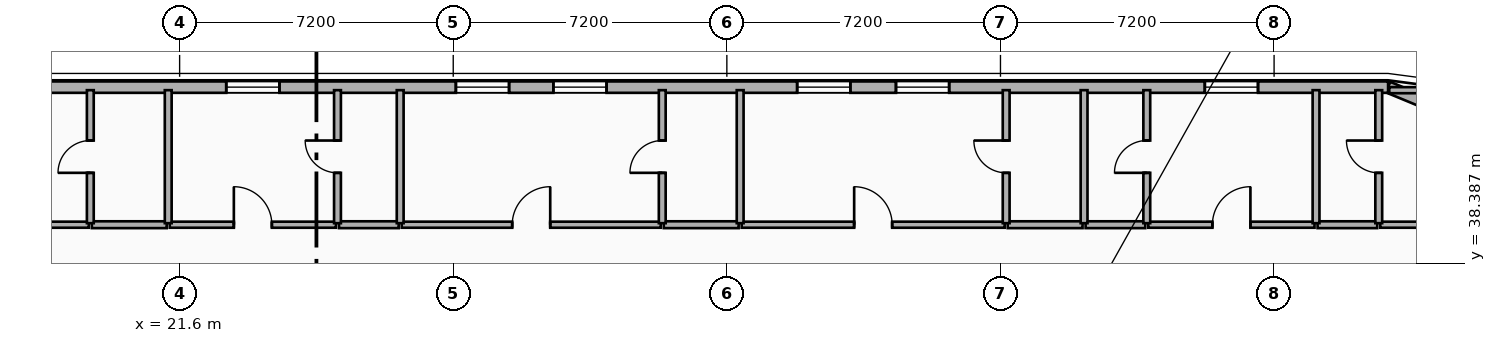
"""IFC4 building model, lengths in metres.
Left out: names, types, materials, properties, quantities, classifications, styles, units other than length and angle.
Written with IfcOpenShell. Run it as: python <this file> out.ifc"""

import sys

from ifc_helpers import new_model, si_unit, direction, frame, frame_2d, origin, place, context, subcontext, project, spatial, rectangle, extrude, element, fill, save


model = new_model("IFC4")
c1 = context("Model", 3, precision=1e-05, world=origin(), true_north=direction((0.0, 1.0)))
c2 = subcontext(c1, "Body", "Model", "MODEL_VIEW")
j1 = project(units=[si_unit("LENGTHUNIT", "METRE"), si_unit("PLANEANGLEUNIT", "RADIAN")], contexts=[c1])
p1 = place(None, origin())
s1 = spatial("IfcSite", under=j1, at=p1, CompositionType="ELEMENT")
p2 = place(p1, origin())
s2 = spatial("IfcBuilding", under=s1, at=p2, CompositionType="ELEMENT")
p3 = place(p2, frame((0.0, 0.0, 118.8)))
s3 = spatial("IfcBuildingStorey", under=s2, at=p3, CompositionType="ELEMENT", Elevation=118.8)
p4 = place(p3, frame((53.4, 43.02, 0.0), z_axis=(0.0, 0.0, 1.0), x_axis=(0.923882414032, -0.382676475685, 0.0)))
e1 = element("IfcWall", 1, at=p4, inside=s3, PredefinedType="SOLIDWALL", context=c2, shape_type="SweptSolid", body=[
    extrude(rectangle(XDim=3.077, YDim=0.3, at=frame_2d((1.539, 0.0))), origin(), (0.0, 0.0, 1.0), 3.24),
])
p5 = place(p3, frame((4.2, 43.02, 0.0), z_axis=(0.0, 0.0, 1.0), x_axis=(1.0, 0.0, 0.0)))
e2 = element("IfcWall", 2, at=p5, inside=s3, PredefinedType="SOLIDWALL", context=c2, shape_type="SweptSolid", body=[
    extrude(rectangle(XDim=49.2, YDim=0.3, at=frame_2d((24.6, 0.0))), origin(), (0.0, 0.0, 1.0), 3.24),
])
p6 = place(p5, frame((9.09, 0.0, 0.85)))
e3 = element("IfcOpeningElement", 3, at=p6, cuts=e2, PredefinedType="OPENING", context=c2, shape_type="SweptSolid", body=[
    extrude(rectangle(XDim=1.4, YDim=1.8, at=frame_2d((0.7, 0.9))), frame((0.0, 0.16, 0.0), z_axis=(0.0, -1.0, 0.0), x_axis=(1.0, 0.0, 0.0)), (0.0, 0.0, 1.0), 0.32),
])
p7 = place(p5, frame((11.92, 0.0, 0.85)))
e4 = element("IfcOpeningElement", 4, at=p7, cuts=e2, PredefinedType="OPENING", context=c2, shape_type="SweptSolid", body=[
    extrude(rectangle(XDim=1.4, YDim=1.8, at=frame_2d((0.7, 0.9))), frame((0.0, 0.16, 0.0), z_axis=(0.0, -1.0, 0.0), x_axis=(1.0, 0.0, 0.0)), (0.0, 0.0, 1.0), 0.32),
])
p8 = place(p5, frame((18.627, 0.0, 0.85)))
e5 = element("IfcOpeningElement", 5, at=p8, cuts=e2, PredefinedType="OPENING", context=c2, shape_type="SweptSolid", body=[
    extrude(rectangle(XDim=1.4, YDim=1.8, at=frame_2d((0.7, 0.9))), frame((0.0, 0.16, 0.0), z_axis=(0.0, -1.0, 0.0), x_axis=(1.0, 0.0, 0.0)), (0.0, 0.0, 1.0), 0.32),
])
p9 = place(p5, frame((24.669, 0.0, 0.85)))
e6 = element("IfcOpeningElement", 6, at=p9, cuts=e2, PredefinedType="OPENING", context=c2, shape_type="SweptSolid", body=[
    extrude(rectangle(XDim=1.4, YDim=1.8, at=frame_2d((0.7, 0.9))), frame((0.0, 0.16, 0.0), z_axis=(0.0, -1.0, 0.0), x_axis=(1.0, 0.0, 0.0)), (0.0, 0.0, 1.0), 0.32),
])
p10 = place(p5, frame((27.235, 0.0, 0.85)))
e7 = element("IfcOpeningElement", 7, at=p10, cuts=e2, PredefinedType="OPENING", context=c2, shape_type="SweptSolid", body=[
    extrude(rectangle(XDim=1.4, YDim=1.8, at=frame_2d((0.7, 0.9))), frame((0.0, 0.16, 0.0), z_axis=(0.0, -1.0, 0.0), x_axis=(1.0, 0.0, 0.0)), (0.0, 0.0, 1.0), 0.32),
])
p11 = place(p5, frame((33.65, 0.0, 0.85)))
e8 = element("IfcOpeningElement", 8, at=p11, cuts=e2, PredefinedType="OPENING", context=c2, shape_type="SweptSolid", body=[
    extrude(rectangle(XDim=1.4, YDim=1.8, at=frame_2d((0.7, 0.9))), frame((0.0, 0.16, 0.0), z_axis=(0.0, -1.0, 0.0), x_axis=(1.0, 0.0, 0.0)), (0.0, 0.0, 1.0), 0.32),
])
p12 = place(p5, frame((36.25, 0.0, 0.85)))
e9 = element("IfcOpeningElement", 9, at=p12, cuts=e2, PredefinedType="OPENING", context=c2, shape_type="SweptSolid", body=[
    extrude(rectangle(XDim=1.4, YDim=1.8, at=frame_2d((0.7, 0.9))), frame((0.0, 0.16, 0.0), z_axis=(0.0, -1.0, 0.0), x_axis=(1.0, 0.0, 0.0)), (0.0, 0.0, 1.0), 0.32),
])
p13 = place(p5, frame((44.377, 0.0, 0.85)))
e10 = element("IfcOpeningElement", 10, at=p13, cuts=e2, PredefinedType="OPENING", context=c2, shape_type="SweptSolid", body=[
    extrude(rectangle(XDim=1.4, YDim=1.8, at=frame_2d((0.7, 0.9))), frame((0.0, 0.16, 0.0), z_axis=(0.0, -1.0, 0.0), x_axis=(1.0, 0.0, 0.0)), (0.0, 0.0, 1.0), 0.32),
])
p14 = place(p3, frame((11.6, 39.4, 0.0), z_axis=(0.0, 0.0, 1.0), x_axis=(1.0, 0.0, 0.0)))
e11 = element("IfcWall", 11, at=p14, inside=s3, PredefinedType="PARTITIONING", context=c2, shape_type="SweptSolid", body=[
    extrude(rectangle(XDim=7.61, YDim=0.16, at=frame_2d((3.805, 0.0))), origin(), (0.0, 0.0, 1.0), 3.24),
])
p15 = place(p14, frame((3.305, 0.0, 0.0)))
e12 = element("IfcOpeningElement", 12, at=p15, cuts=e11, PredefinedType="OPENING", context=c2, shape_type="SweptSolid", body=[
    extrude(rectangle(XDim=1.0, YDim=2.15, at=frame_2d((0.5, 1.075))), frame((0.0, 0.09, 0.0), z_axis=(0.0, -1.0, 0.0), x_axis=(1.0, 0.0, 0.0)), (0.0, 0.0, 1.0), 0.18),
])
p16 = place(p3, frame((19.29, 39.4, 0.0), z_axis=(0.0, 0.0, 1.0), x_axis=(1.0, 0.0, 0.0)))
e13 = element("IfcWall", 13, at=p16, inside=s3, PredefinedType="PLUMBINGWALL", context=c2, shape_type="SweptSolid", body=[
    extrude(rectangle(XDim=1.97, YDim=0.18, at=frame_2d((0.985, 0.0))), origin(), (0.0, 0.0, 1.0), 3.24),
])
p17 = place(p3, frame((21.34, 39.4, 0.0), z_axis=(0.0, 0.0, 1.0), x_axis=(1.0, 0.0, 0.0)))
e14 = element("IfcWall", 14, at=p17, inside=s3, PredefinedType="PARTITIONING", context=c2, shape_type="SweptSolid", body=[
    extrude(rectangle(XDim=4.374, YDim=0.16, at=frame_2d((2.187, 0.0))), origin(), (0.0, 0.0, 1.0), 3.24),
])
p18 = place(p17, frame((1.687, 0.0, 0.0)))
e15 = element("IfcOpeningElement", 15, at=p18, cuts=e14, PredefinedType="OPENING", context=c2, shape_type="SweptSolid", body=[
    extrude(rectangle(XDim=1.0, YDim=2.15, at=frame_2d((0.5, 1.075))), frame((0.0, 0.09, 0.0), z_axis=(0.0, -1.0, 0.0), x_axis=(1.0, 0.0, 0.0)), (0.0, 0.0, 1.0), 0.18),
])
p19 = place(p3, frame((25.794, 39.4, 0.0), z_axis=(0.0, 0.0, 1.0), x_axis=(1.0, 0.0, 0.0)))
e16 = element("IfcWall", 16, at=p19, inside=s3, PredefinedType="PLUMBINGWALL", context=c2, shape_type="SweptSolid", body=[
    extrude(rectangle(XDim=1.57, YDim=0.18, at=frame_2d((0.785, 0.0))), origin(), (0.0, 0.0, 1.0), 3.24),
])
p20 = place(p3, frame((27.444, 39.4, 0.0), z_axis=(0.0, 0.0, 1.0), x_axis=(1.0, 0.0, 0.0)))
e17 = element("IfcWall", 17, at=p20, inside=s3, PredefinedType="PARTITIONING", context=c2, shape_type="SweptSolid", body=[
    extrude(rectangle(XDim=6.816, YDim=0.16, at=frame_2d((3.408, 0.0))), origin(), (0.0, 0.0, 1.0), 3.24),
])
p21 = place(p20, frame((2.908, 0.0, 0.0)))
e18 = element("IfcOpeningElement", 18, at=p21, cuts=e17, PredefinedType="OPENING", context=c2, shape_type="SweptSolid", body=[
    extrude(rectangle(XDim=1.0, YDim=2.15, at=frame_2d((0.5, 1.075))), frame((0.0, 0.09, 0.0), z_axis=(0.0, -1.0, 0.0), x_axis=(1.0, 0.0, 0.0)), (0.0, 0.0, 1.0), 0.18),
])
p22 = place(p3, frame((34.34, 39.4, 0.0), z_axis=(0.0, 0.0, 1.0), x_axis=(1.0, 0.0, 0.0)))
e19 = element("IfcWall", 19, at=p22, inside=s3, PredefinedType="PLUMBINGWALL", context=c2, shape_type="SweptSolid", body=[
    extrude(rectangle(XDim=1.97, YDim=0.18, at=frame_2d((0.985, 0.0))), origin(), (0.0, 0.0, 1.0), 3.24),
])
p23 = place(p3, frame((36.39, 39.4, 0.0), z_axis=(0.0, 0.0, 1.0), x_axis=(1.0, 0.0, 0.0)))
e20 = element("IfcWall", 20, at=p23, inside=s3, PredefinedType="PARTITIONING", context=c2, shape_type="SweptSolid", body=[
    extrude(rectangle(XDim=6.92, YDim=0.16, at=frame_2d((3.46, 0.0))), origin(), (0.0, 0.0, 1.0), 3.24),
])
p24 = place(p23, frame((2.96, 0.0, 0.0)))
e21 = element("IfcOpeningElement", 21, at=p24, cuts=e20, PredefinedType="OPENING", context=c2, shape_type="SweptSolid", body=[
    extrude(rectangle(XDim=1.0, YDim=2.15, at=frame_2d((0.5, 1.075))), frame((0.0, 0.09, 0.0), z_axis=(0.0, -1.0, 0.0), x_axis=(1.0, 0.0, 0.0)), (0.0, 0.0, 1.0), 0.18),
])
p25 = place(p3, frame((43.39, 39.4, 0.0), z_axis=(0.0, 0.0, 1.0), x_axis=(1.0, 0.0, 0.0)))
e22 = element("IfcWall", 22, at=p25, inside=s3, PredefinedType="PLUMBINGWALL", context=c2, shape_type="SweptSolid", body=[
    extrude(rectangle(XDim=1.97, YDim=0.18, at=frame_2d((0.985, 0.0))), origin(), (0.0, 0.0, 1.0), 3.24),
])
p26 = place(p3, frame((47.09, 39.4, 0.0), z_axis=(0.0, 0.0, 1.0), x_axis=(1.0, 0.0, 0.0)))
e23 = element("IfcWall", 23, at=p26, inside=s3, PredefinedType="PARTITIONING", context=c2, shape_type="SweptSolid", body=[
    extrude(rectangle(XDim=4.374, YDim=0.16, at=frame_2d((2.187, 0.0))), origin(), (0.0, 0.0, 1.0), 3.24),
])
p27 = place(p26, frame((1.687, 0.0, 0.0)))
e24 = element("IfcOpeningElement", 24, at=p27, cuts=e23, PredefinedType="OPENING", context=c2, shape_type="SweptSolid", body=[
    extrude(rectangle(XDim=1.0, YDim=2.15, at=frame_2d((0.5, 1.075))), frame((0.0, 0.09, 0.0), z_axis=(0.0, -1.0, 0.0), x_axis=(1.0, 0.0, 0.0)), (0.0, 0.0, 1.0), 0.18),
])
p28 = place(p3, frame((45.44, 39.4, 0.0), z_axis=(0.0, 0.0, 1.0), x_axis=(1.0, 0.0, 0.0)))
e25 = element("IfcWall", 25, at=p28, inside=s3, PredefinedType="PLUMBINGWALL", context=c2, shape_type="SweptSolid", body=[
    extrude(rectangle(XDim=1.57, YDim=0.18, at=frame_2d((0.785, 0.0))), origin(), (0.0, 0.0, 1.0), 3.24),
])
p29 = place(p3, frame((53.194, 39.4, 0.0), z_axis=(0.0, 0.0, 1.0), x_axis=(1.0, 0.0, 0.0)))
e26 = element("IfcWall", 26, at=p29, inside=s3, PredefinedType="PARTITIONING", context=c2, shape_type="SweptSolid", body=[
    extrude(rectangle(XDim=4.146, YDim=0.16, at=frame_2d((2.073, 0.0))), origin(), (0.0, 0.0, 1.0), 3.24),
])
p30 = place(p29, frame((1.573, 0.0, 0.0)))
e27 = element("IfcOpeningElement", 27, at=p30, cuts=e26, PredefinedType="OPENING", context=c2, shape_type="SweptSolid", body=[
    extrude(rectangle(XDim=1.0, YDim=2.15, at=frame_2d((0.5, 1.075))), frame((0.0, 0.09, 0.0), z_axis=(0.0, -1.0, 0.0), x_axis=(1.0, 0.0, 0.0)), (0.0, 0.0, 1.0), 0.18),
])
p31 = place(p3, frame((51.544, 39.4, 0.0), z_axis=(0.0, 0.0, 1.0), x_axis=(1.0, 0.0, 0.0)))
e28 = element("IfcWall", 28, at=p31, inside=s3, PredefinedType="PLUMBINGWALL", context=c2, shape_type="SweptSolid", body=[
    extrude(rectangle(XDim=1.57, YDim=0.18, at=frame_2d((0.785, 0.0))), origin(), (0.0, 0.0, 1.0), 3.24),
])
p32 = place(p3, frame((19.25, 39.44, 0.0), z_axis=(0.0, 0.0, 1.0), x_axis=(0.0, 1.0, 0.0)))
e29 = element("IfcWall", 29, at=p32, inside=s3, PredefinedType="PLUMBINGWALL", context=c2, shape_type="SweptSolid", body=[
    extrude(rectangle(XDim=3.5, YDim=0.18, at=frame_2d((1.75, 0.0))), origin(), (0.0, 0.0, 1.0), 3.24),
])
p33 = place(p32, frame((1.325, 0.0, 0.0)))
e30 = element("IfcOpeningElement", 30, at=p33, cuts=e29, PredefinedType="OPENING", context=c2, shape_type="SweptSolid", body=[
    extrude(rectangle(XDim=0.85, YDim=2.1, at=frame_2d((0.425, 1.05))), frame((0.0, 0.1, 0.0), z_axis=(0.0, -1.0, 0.0), x_axis=(1.0, 0.0, 0.0)), (0.0, 0.0, 1.0), 0.2),
])
p34 = place(p3, frame((21.3, 39.44, 0.0), z_axis=(0.0, 0.0, 1.0), x_axis=(0.0, 1.0, 0.0)))
e31 = element("IfcWall", 31, at=p34, inside=s3, PredefinedType="PLUMBINGWALL", context=c2, shape_type="SweptSolid", body=[
    extrude(rectangle(XDim=3.5, YDim=0.18, at=frame_2d((1.75, 0.0))), origin(), (0.0, 0.0, 1.0), 3.24),
])
p35 = place(p3, frame((25.754, 39.44, 0.0), z_axis=(0.0, 0.0, 1.0), x_axis=(0.0, 1.0, 0.0)))
e32 = element("IfcWall", 32, at=p35, inside=s3, PredefinedType="PLUMBINGWALL", context=c2, shape_type="SweptSolid", body=[
    extrude(rectangle(XDim=3.5, YDim=0.18, at=frame_2d((1.75, 0.0))), origin(), (0.0, 0.0, 1.0), 3.24),
])
p36 = place(p35, frame((1.325, 0.0, 0.0)))
e33 = element("IfcOpeningElement", 33, at=p36, cuts=e32, PredefinedType="OPENING", context=c2, shape_type="SweptSolid", body=[
    extrude(rectangle(XDim=0.85, YDim=2.1, at=frame_2d((0.425, 1.05))), frame((0.0, 0.1, 0.0), z_axis=(0.0, -1.0, 0.0), x_axis=(1.0, 0.0, 0.0)), (0.0, 0.0, 1.0), 0.2),
])
p37 = place(p3, frame((27.404, 39.44, 0.0), z_axis=(0.0, 0.0, 1.0), x_axis=(0.0, 1.0, 0.0)))
e34 = element("IfcWall", 34, at=p37, inside=s3, PredefinedType="PLUMBINGWALL", context=c2, shape_type="SweptSolid", body=[
    extrude(rectangle(XDim=3.5, YDim=0.18, at=frame_2d((1.75, 0.0))), origin(), (0.0, 0.0, 1.0), 3.24),
])
p38 = place(p3, frame((34.3, 39.44, 0.0), z_axis=(0.0, 0.0, 1.0), x_axis=(0.0, 1.0, 0.0)))
e35 = element("IfcWall", 35, at=p38, inside=s3, PredefinedType="PLUMBINGWALL", context=c2, shape_type="SweptSolid", body=[
    extrude(rectangle(XDim=3.5, YDim=0.18, at=frame_2d((1.75, 0.0))), origin(), (0.0, 0.0, 1.0), 3.24),
])
p39 = place(p38, frame((1.325, 0.0, 0.0)))
e36 = element("IfcOpeningElement", 36, at=p39, cuts=e35, PredefinedType="OPENING", context=c2, shape_type="SweptSolid", body=[
    extrude(rectangle(XDim=0.85, YDim=2.1, at=frame_2d((0.425, 1.05))), frame((0.0, 0.1, 0.0), z_axis=(0.0, -1.0, 0.0), x_axis=(1.0, 0.0, 0.0)), (0.0, 0.0, 1.0), 0.2),
])
p40 = place(p3, frame((36.35, 39.44, 0.0), z_axis=(0.0, 0.0, 1.0), x_axis=(0.0, 1.0, 0.0)))
e37 = element("IfcWall", 37, at=p40, inside=s3, PredefinedType="PLUMBINGWALL", context=c2, shape_type="SweptSolid", body=[
    extrude(rectangle(XDim=3.5, YDim=0.18, at=frame_2d((1.75, 0.0))), origin(), (0.0, 0.0, 1.0), 3.24),
])
p41 = place(p3, frame((43.35, 39.44, 0.0), z_axis=(0.0, 0.0, 1.0), x_axis=(0.0, 1.0, 0.0)))
e38 = element("IfcWall", 38, at=p41, inside=s3, PredefinedType="PLUMBINGWALL", context=c2, shape_type="SweptSolid", body=[
    extrude(rectangle(XDim=3.5, YDim=0.18, at=frame_2d((1.75, 0.0))), origin(), (0.0, 0.0, 1.0), 3.24),
])
p42 = place(p41, frame((1.325, 0.0, 0.0)))
e39 = element("IfcOpeningElement", 39, at=p42, cuts=e38, PredefinedType="OPENING", context=c2, shape_type="SweptSolid", body=[
    extrude(rectangle(XDim=0.85, YDim=2.1, at=frame_2d((0.425, 1.05))), frame((0.0, 0.1, 0.0), z_axis=(0.0, -1.0, 0.0), x_axis=(1.0, 0.0, 0.0)), (0.0, 0.0, 1.0), 0.2),
])
p43 = place(p3, frame((45.4, 39.44, 0.0), z_axis=(0.0, 0.0, 1.0), x_axis=(0.0, 1.0, 0.0)))
e40 = element("IfcWall", 40, at=p43, inside=s3, PredefinedType="PLUMBINGWALL", context=c2, shape_type="SweptSolid", body=[
    extrude(rectangle(XDim=3.5, YDim=0.18, at=frame_2d((1.75, 0.0))), origin(), (0.0, 0.0, 1.0), 3.24),
])
p44 = place(p3, frame((47.05, 39.44, 0.0), z_axis=(0.0, 0.0, 1.0), x_axis=(0.0, 1.0, 0.0)))
e41 = element("IfcWall", 41, at=p44, inside=s3, PredefinedType="PLUMBINGWALL", context=c2, shape_type="SweptSolid", body=[
    extrude(rectangle(XDim=3.5, YDim=0.18, at=frame_2d((1.75, 0.0))), origin(), (0.0, 0.0, 1.0), 3.24),
])
p45 = place(p44, frame((1.325, 0.0, 0.0)))
e42 = element("IfcOpeningElement", 42, at=p45, cuts=e41, PredefinedType="OPENING", context=c2, shape_type="SweptSolid", body=[
    extrude(rectangle(XDim=0.85, YDim=2.1, at=frame_2d((0.425, 1.05))), frame((0.0, 0.1, 0.0), z_axis=(0.0, -1.0, 0.0), x_axis=(1.0, 0.0, 0.0)), (0.0, 0.0, 1.0), 0.2),
])
p46 = place(p3, frame((51.504, 39.44, 0.0), z_axis=(0.0, 0.0, 1.0), x_axis=(0.0, 1.0, 0.0)))
e43 = element("IfcWall", 43, at=p46, inside=s3, PredefinedType="PLUMBINGWALL", context=c2, shape_type="SweptSolid", body=[
    extrude(rectangle(XDim=3.5, YDim=0.18, at=frame_2d((1.75, 0.0))), origin(), (0.0, 0.0, 1.0), 3.24),
])
p47 = place(p3, frame((53.154, 39.44, 0.0), z_axis=(0.0, 0.0, 1.0), x_axis=(0.0, 1.0, 0.0)))
e44 = element("IfcWall", 44, at=p47, inside=s3, PredefinedType="PLUMBINGWALL", context=c2, shape_type="SweptSolid", body=[
    extrude(rectangle(XDim=3.5, YDim=0.18, at=frame_2d((1.75, 0.0))), origin(), (0.0, 0.0, 1.0), 3.24),
])
p48 = place(p47, frame((1.325, 0.0, 0.0)))
e45 = element("IfcOpeningElement", 45, at=p48, cuts=e44, PredefinedType="OPENING", context=c2, shape_type="SweptSolid", body=[
    extrude(rectangle(XDim=0.85, YDim=2.1, at=frame_2d((0.425, 1.05))), frame((0.0, 0.1, 0.0), z_axis=(0.0, -1.0, 0.0), x_axis=(1.0, 0.0, 0.0)), (0.0, 0.0, 1.0), 0.2),
])
p49 = place(p3, frame((53.43, 42.94, 0.0), z_axis=(0.0, 0.0, 1.0), x_axis=(1.0, 0.0, 0.0)))
e46 = element("IfcWall", 46, at=p49, inside=s3, PredefinedType="PARTITIONING", context=c2, shape_type="SweptSolid", body=[
    extrude(rectangle(XDim=3.88, YDim=0.16, at=frame_2d((1.94, 0.0))), origin(), (0.0, 0.0, 1.0), 3.24),
])
p50 = place(p8, origin())
e47 = element("IfcWindow", 47, at=p50, inside=s3, PartitioningType="SINGLE_PANEL", PredefinedType="WINDOW", context=c2, shape_type="SweptSolid", body=[
    extrude(rectangle(XDim=1.4, YDim=1.8, at=frame_2d((0.7, 0.9))), frame((0.0, 0.03, 0.0), z_axis=(0.0, -1.0, 0.0), x_axis=(1.0, 0.0, 0.0)), (0.0, 0.0, 1.0), 0.06),
])
fill(e5, e47)
p51 = place(p9, origin())
e48 = element("IfcWindow", 48, at=p51, inside=s3, PartitioningType="SINGLE_PANEL", PredefinedType="WINDOW", context=c2, shape_type="SweptSolid", body=[
    extrude(rectangle(XDim=1.4, YDim=1.8, at=frame_2d((0.7, 0.9))), frame((0.0, 0.03, 0.0), z_axis=(0.0, -1.0, 0.0), x_axis=(1.0, 0.0, 0.0)), (0.0, 0.0, 1.0), 0.06),
])
fill(e6, e48)
p52 = place(p10, origin())
e49 = element("IfcWindow", 49, at=p52, inside=s3, PartitioningType="SINGLE_PANEL", PredefinedType="WINDOW", context=c2, shape_type="SweptSolid", body=[
    extrude(rectangle(XDim=1.4, YDim=1.8, at=frame_2d((0.7, 0.9))), frame((0.0, 0.03, 0.0), z_axis=(0.0, -1.0, 0.0), x_axis=(1.0, 0.0, 0.0)), (0.0, 0.0, 1.0), 0.06),
])
fill(e7, e49)
p53 = place(p11, origin())
e50 = element("IfcWindow", 50, at=p53, inside=s3, PartitioningType="SINGLE_PANEL", PredefinedType="WINDOW", context=c2, shape_type="SweptSolid", body=[
    extrude(rectangle(XDim=1.4, YDim=1.8, at=frame_2d((0.7, 0.9))), frame((0.0, 0.03, 0.0), z_axis=(0.0, -1.0, 0.0), x_axis=(1.0, 0.0, 0.0)), (0.0, 0.0, 1.0), 0.06),
])
fill(e8, e50)
p54 = place(p12, origin())
e51 = element("IfcWindow", 51, at=p54, inside=s3, PartitioningType="SINGLE_PANEL", PredefinedType="WINDOW", context=c2, shape_type="SweptSolid", body=[
    extrude(rectangle(XDim=1.4, YDim=1.8, at=frame_2d((0.7, 0.9))), frame((0.0, 0.03, 0.0), z_axis=(0.0, -1.0, 0.0), x_axis=(1.0, 0.0, 0.0)), (0.0, 0.0, 1.0), 0.06),
])
fill(e9, e51)
p55 = place(p13, origin())
e52 = element("IfcWindow", 52, at=p55, inside=s3, PartitioningType="SINGLE_PANEL", PredefinedType="WINDOW", context=c2, shape_type="SweptSolid", body=[
    extrude(rectangle(XDim=1.4, YDim=1.8, at=frame_2d((0.7, 0.9))), frame((0.0, 0.03, 0.0), z_axis=(0.0, -1.0, 0.0), x_axis=(1.0, 0.0, 0.0)), (0.0, 0.0, 1.0), 0.06),
])
fill(e10, e52)
p56 = place(p18, origin())
e53 = element("IfcDoor", 53, at=p56, inside=s3, OperationType="SINGLE_SWING_LEFT", PredefinedType="DOOR", context=c2, shape_type="SweptSolid", body=[
    extrude(rectangle(XDim=1.0, YDim=2.15, at=frame_2d((0.5, 1.075))), frame((0.0, 0.025, 0.0), z_axis=(0.0, -1.0, 0.0), x_axis=(1.0, 0.0, 0.0)), (0.0, 0.0, 1.0), 0.05),
])
fill(e15, e53)
p57 = place(p21, origin())
e54 = element("IfcDoor", 54, at=p57, inside=s3, OperationType="SINGLE_SWING_RIGHT", PredefinedType="DOOR", context=c2, shape_type="SweptSolid", body=[
    extrude(rectangle(XDim=1.0, YDim=2.15, at=frame_2d((0.5, 1.075))), frame((0.0, 0.025, 0.0), z_axis=(0.0, -1.0, 0.0), x_axis=(1.0, 0.0, 0.0)), (0.0, 0.0, 1.0), 0.05),
])
fill(e18, e54)
p58 = place(p24, origin())
e55 = element("IfcDoor", 55, at=p58, inside=s3, OperationType="SINGLE_SWING_LEFT", PredefinedType="DOOR", context=c2, shape_type="SweptSolid", body=[
    extrude(rectangle(XDim=1.0, YDim=2.15, at=frame_2d((0.5, 1.075))), frame((0.0, 0.025, 0.0), z_axis=(0.0, -1.0, 0.0), x_axis=(1.0, 0.0, 0.0)), (0.0, 0.0, 1.0), 0.05),
])
fill(e21, e55)
p59 = place(p27, origin())
e56 = element("IfcDoor", 56, at=p59, inside=s3, OperationType="SINGLE_SWING_RIGHT", PredefinedType="DOOR", context=c2, shape_type="SweptSolid", body=[
    extrude(rectangle(XDim=1.0, YDim=2.15, at=frame_2d((0.5, 1.075))), frame((0.0, 0.025, 0.0), z_axis=(0.0, -1.0, 0.0), x_axis=(1.0, 0.0, 0.0)), (0.0, 0.0, 1.0), 0.05),
])
fill(e24, e56)
p60 = place(p33, origin())
e57 = element("IfcDoor", 57, at=p60, inside=s3, OperationType="SINGLE_SWING_LEFT", PredefinedType="DOOR", context=c2, shape_type="SweptSolid", body=[
    extrude(rectangle(XDim=0.85, YDim=2.1, at=frame_2d((0.425, 1.05))), frame((0.0, 0.025, 0.0), z_axis=(0.0, -1.0, 0.0), x_axis=(1.0, 0.0, 0.0)), (0.0, 0.0, 1.0), 0.05),
])
fill(e30, e57)
p61 = place(p36, origin())
e58 = element("IfcDoor", 58, at=p61, inside=s3, OperationType="SINGLE_SWING_RIGHT", PredefinedType="DOOR", context=c2, shape_type="SweptSolid", body=[
    extrude(rectangle(XDim=0.85, YDim=2.1, at=frame_2d((0.425, 1.05))), frame((0.0, 0.025, 0.0), z_axis=(0.0, -1.0, 0.0), x_axis=(1.0, 0.0, 0.0)), (0.0, 0.0, 1.0), 0.05),
])
fill(e33, e58)
p62 = place(p39, origin())
e59 = element("IfcDoor", 59, at=p62, inside=s3, OperationType="SINGLE_SWING_LEFT", PredefinedType="DOOR", context=c2, shape_type="SweptSolid", body=[
    extrude(rectangle(XDim=0.85, YDim=2.1, at=frame_2d((0.425, 1.05))), frame((0.0, 0.025, 0.0), z_axis=(0.0, -1.0, 0.0), x_axis=(1.0, 0.0, 0.0)), (0.0, 0.0, 1.0), 0.05),
])
fill(e36, e59)
p63 = place(p42, origin())
e60 = element("IfcDoor", 60, at=p63, inside=s3, OperationType="SINGLE_SWING_RIGHT", PredefinedType="DOOR", context=c2, shape_type="SweptSolid", body=[
    extrude(rectangle(XDim=0.85, YDim=2.1, at=frame_2d((0.425, 1.05))), frame((0.0, 0.025, 0.0), z_axis=(0.0, -1.0, 0.0), x_axis=(1.0, 0.0, 0.0)), (0.0, 0.0, 1.0), 0.05),
])
fill(e39, e60)
p64 = place(p45, origin())
e61 = element("IfcDoor", 61, at=p64, inside=s3, OperationType="SINGLE_SWING_LEFT", PredefinedType="DOOR", context=c2, shape_type="SweptSolid", body=[
    extrude(rectangle(XDim=0.85, YDim=2.1, at=frame_2d((0.425, 1.05))), frame((0.0, 0.025, 0.0), z_axis=(0.0, -1.0, 0.0), x_axis=(1.0, 0.0, 0.0)), (0.0, 0.0, 1.0), 0.05),
])
fill(e42, e61)
p65 = place(p48, origin())
e62 = element("IfcDoor", 62, at=p65, inside=s3, OperationType="SINGLE_SWING_RIGHT", PredefinedType="DOOR", context=c2, shape_type="SweptSolid", body=[
    extrude(rectangle(XDim=0.85, YDim=2.1, at=frame_2d((0.425, 1.05))), frame((0.0, 0.025, 0.0), z_axis=(0.0, -1.0, 0.0), x_axis=(1.0, 0.0, 0.0)), (0.0, 0.0, 1.0), 0.05),
])
fill(e45, e62)
save(model, sys.argv[1])
